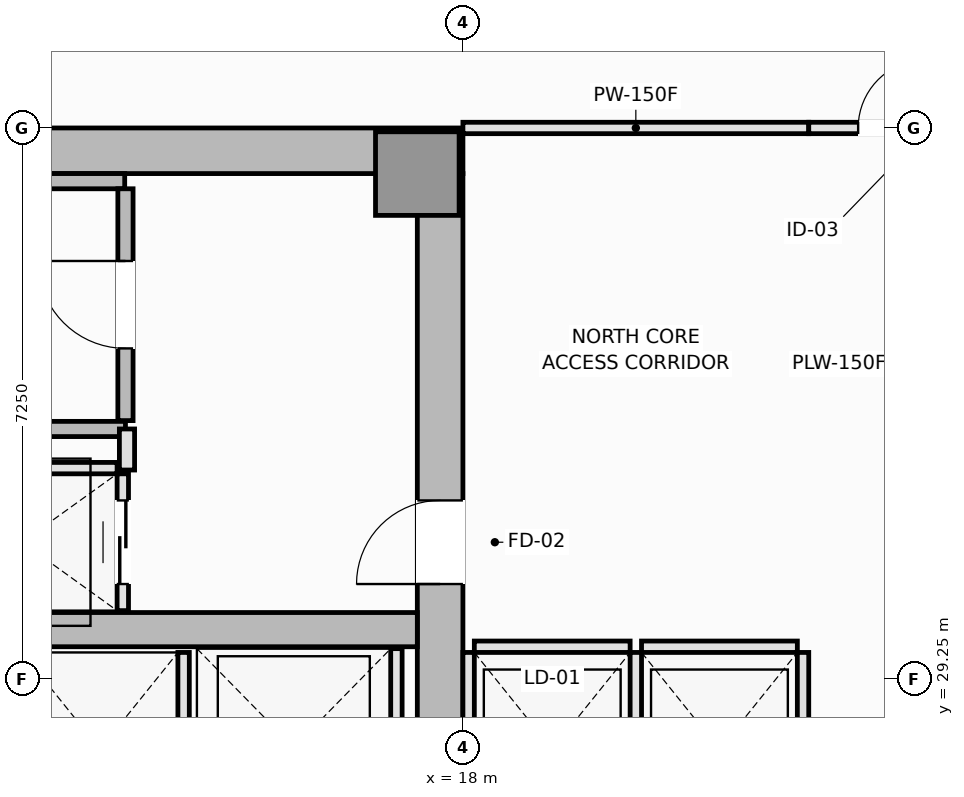
"""IFC4 building model, lengths in metres.
Left out: names, types, materials, properties, quantities, classifications, styles, units other than length and angle.
Written with IfcOpenShell. Run it as: python <this file> out.ifc"""

import sys

from ifc_helpers import new_model, si_unit, direction, frame, frame_2d, origin, origin_2d, place, context, subcontext, project, spatial, rectangle, extrude, element, fill, save


model = new_model("IFC4")
c1 = context("Model", 3, precision=1e-05, world=origin(), true_north=direction((0.0, 1.0)))
c2 = subcontext(c1, "Body", "Model", "MODEL_VIEW")
j1 = project(units=[si_unit("LENGTHUNIT", "METRE"), si_unit("PLANEANGLEUNIT", "RADIAN")], contexts=[c1])
p1 = place(None, origin())
s1 = spatial("IfcSite", under=j1, at=p1, CompositionType="ELEMENT")
p2 = place(p1, origin())
s2 = spatial("IfcBuilding", under=s1, at=p2, CompositionType="ELEMENT")
p3 = place(p2, frame((0.0, 0.0, 97.85)))
s3 = spatial("IfcBuildingStorey", under=s2, at=p3, CompositionType="ELEMENT", Elevation=97.85)
p4 = place(p3, frame((4.5, 36.2, 0.0), z_axis=(0.0, 0.0, 1.0), x_axis=(1.0, 0.0, 0.0)))
e1 = element("IfcWall", 1, at=p4, inside=s3, PredefinedType="SHEAR", context=c2, shape_type="SweptSolid", body=[
    extrude(rectangle(XDim=13.5, YDim=0.6, at=frame_2d((6.75, 0.0))), origin(), (0.0, 0.0, 1.0), 4.4),
])
p5 = place(p3, frame((17.7, 27.05, 0.0), z_axis=(0.0, 0.0, 1.0), x_axis=(0.0, 1.0, 0.0)))
e2 = element("IfcWall", 2, at=p5, inside=s3, PredefinedType="SHEAR", context=c2, shape_type="SweptSolid", body=[
    extrude(rectangle(XDim=8.85, YDim=0.6, at=frame_2d((4.425, 0.0))), origin(), (0.0, 0.0, 1.0), 4.4),
])
p6 = place(p5, frame((3.45, 0.0, 0.0)))
e3 = element("IfcOpeningElement", 3, at=p6, cuts=e2, PredefinedType="OPENING", context=c2, shape_type="SweptSolid", body=[
    extrude(rectangle(XDim=1.1, YDim=2.15, at=frame_2d((0.55, 1.075))), frame((0.0, 0.31, 0.0), z_axis=(0.0, -1.0, 0.0), x_axis=(1.0, 0.0, 0.0)), (0.0, 0.0, 1.0), 0.62),
])
p7 = place(p3, frame((5.1, 29.9, 0.0), z_axis=(0.0, 0.0, 1.0), x_axis=(1.0, 0.0, 0.0)))
e4 = element("IfcWall", 4, at=p7, inside=s3, PredefinedType="SHEAR", context=c2, shape_type="SweptSolid", body=[
    extrude(rectangle(XDim=12.3, YDim=0.45, at=frame_2d((6.15, 0.0))), origin(), (0.0, 0.0, 1.0), 4.4),
])
p8 = place(p3, frame((17.4, 35.9, 0.0), z_axis=(0.0, 0.0, 1.0), x_axis=(1.0, 0.0, 0.0)))
e5 = element("IfcColumn", 5, at=p8, inside=s3, PredefinedType="PILASTER", context=c2, shape_type="SweptSolid", body=[
    extrude(rectangle(XDim=1.1, YDim=1.1, at=origin_2d()), origin(), (0.0, 0.0, 1.0), 4.4),
])
p9 = place(p3, frame((5.8, 35.8, 0.0), z_axis=(0.0, 0.0, 1.0), x_axis=(1.0, 0.0, 0.0)))
e6 = element("IfcWall", 6, at=p9, inside=s3, PredefinedType="SOLIDWALL", context=c2, shape_type="SweptSolid", body=[
    extrude(rectangle(XDim=7.75, YDim=0.2, at=frame_2d((3.875, 0.0))), origin(), (0.0, 0.0, 1.0), 4.4),
])
p10 = place(p3, frame((5.9, 32.54, 0.0), z_axis=(0.0, 0.0, 1.0), x_axis=(1.0, 0.0, 0.0)))
e7 = element("IfcWall", 7, at=p10, inside=s3, PredefinedType="SOLIDWALL", context=c2, shape_type="SweptSolid", body=[
    extrude(rectangle(XDim=7.66, YDim=0.2, at=frame_2d((3.83, 0.0))), origin(), (0.0, 0.0, 1.0), 4.4),
])
p11 = place(p3, frame((13.56, 32.65, 0.0), z_axis=(0.0, 0.0, 1.0), x_axis=(0.0, 1.0, 0.0)))
e8 = element("IfcWall", 8, at=p11, inside=s3, PredefinedType="SOLIDWALL", context=c2, shape_type="SweptSolid", body=[
    extrude(rectangle(XDim=3.05, YDim=0.2, at=frame_2d((1.525, 0.0))), origin(), (0.0, 0.0, 1.0), 4.4),
])
p12 = place(p11, frame((0.95, 0.0, 0.0)))
e9 = element("IfcOpeningElement", 9, at=p12, cuts=e8, PredefinedType="OPENING", context=c2, shape_type="SweptSolid", body=[
    extrude(rectangle(XDim=1.15, YDim=2.15, at=frame_2d((0.575, 1.075))), frame((0.0, 0.11, 0.0), z_axis=(0.0, -1.0, 0.0), x_axis=(1.0, 0.0, 0.0)), (0.0, 0.0, 1.0), 0.22),
])
p13 = place(p3, frame((18.15, 29.675, 0.0), z_axis=(0.0, 0.0, 1.0), x_axis=(1.0, 0.0, 0.0)))
e10 = element("IfcWall", 10, at=p13, inside=s3, PredefinedType="PARTITIONING", context=c2, shape_type="SweptSolid", body=[
    extrude(rectangle(XDim=2.05, YDim=0.15, at=frame_2d((1.025, 0.0))), origin(), (0.0, 0.0, 1.0), 4.22),
])
for number, where, z_axis, x_axis in (
    (11, (18.075, 27.05, 0.0), (0.0, 0.0, 1.0), (0.0, 1.0, 0.0)),
    (12, (20.275, 27.05, 0.0), (0.0, 0.0, 1.0), (0.0, 1.0, 0.0)),
):
    element("IfcWall", number, at=place(p3, frame(where, z_axis=z_axis, x_axis=x_axis)), inside=s3, PredefinedType="PARTITIONING", context=c2, shape_type="SweptSolid", body=[
        extrude(rectangle(XDim=2.55, YDim=0.15, at=frame_2d((1.275, 0.0))), origin(), (0.0, 0.0, 1.0), 4.22),
    ])
p14 = place(p3, frame((20.35, 29.675, 0.0), z_axis=(0.0, 0.0, 1.0), x_axis=(1.0, 0.0, 0.0)))
e13 = element("IfcWall", 13, at=p14, inside=s3, PredefinedType="PARTITIONING", context=c2, shape_type="SweptSolid", body=[
    extrude(rectangle(XDim=2.05, YDim=0.15, at=frame_2d((1.025, 0.0))), origin(), (0.0, 0.0, 1.0), 4.22),
])
for number, where, z_axis, x_axis in (
    (14, (22.475, 27.05, 0.0), (0.0, 0.0, 1.0), (0.0, 1.0, 0.0)),
    (15, (14.325, 27.05, 0.0), (0.0, 0.0, 1.0), (0.0, 1.0, 0.0)),
):
    element("IfcWall", number, at=place(p3, frame(where, z_axis=z_axis, x_axis=x_axis)), inside=s3, PredefinedType="PARTITIONING", context=c2, shape_type="SweptSolid", body=[
        extrude(rectangle(XDim=2.55, YDim=0.15, at=frame_2d((1.275, 0.0))), origin(), (0.0, 0.0, 1.0), 4.22),
    ])
p15 = place(p3, frame((17.125, 27.05, 0.0), z_axis=(0.0, 0.0, 1.0), x_axis=(0.0, 1.0, 0.0)))
e16 = element("IfcWall", 16, at=p15, inside=s3, PredefinedType="PARTITIONING", context=c2, shape_type="SweptSolid", body=[
    extrude(rectangle(XDim=2.6, YDim=0.15, at=frame_2d((1.3, 0.0))), origin(), (0.0, 0.0, 1.0), 4.22),
])
p16 = place(p3, frame((10.95, 32.025, 0.0), z_axis=(0.0, 0.0, 1.0), x_axis=(1.0, 0.0, 0.0)))
e17 = element("IfcWall", 17, at=p16, inside=s3, PredefinedType="PARTITIONING", context=c2, shape_type="SweptSolid", body=[
    extrude(rectangle(XDim=2.5, YDim=0.15, at=frame_2d((1.25, 0.0))), origin(), (0.0, 0.0, 1.0), 4.22),
])
p17 = place(p3, frame((13.525, 30.15, 0.0), z_axis=(0.0, 0.0, 1.0), x_axis=(0.0, 1.0, 0.0)))
e18 = element("IfcWall", 18, at=p17, inside=s3, PredefinedType="PARTITIONING", context=c2, shape_type="SweptSolid", body=[
    extrude(rectangle(XDim=1.8, YDim=0.15, at=frame_2d((0.9, 0.0))), origin(), (0.0, 0.0, 1.0), 4.22),
])
p18 = place(p17, frame((0.35, 0.0, 0.0)))
e19 = element("IfcOpeningElement", 19, at=p18, cuts=e18, PredefinedType="OPENING", context=c2, shape_type="SweptSolid", body=[
    extrude(rectangle(XDim=1.1, YDim=2.2, at=frame_2d((0.55, 1.1))), frame((0.0, 0.085, 0.0), z_axis=(0.0, -1.0, 0.0), x_axis=(1.0, 0.0, 0.0)), (0.0, 0.0, 1.0), 0.17),
])
p19 = place(p3, frame((13.58, 32.0, 0.0), z_axis=(0.0, 0.0, 1.0), x_axis=(0.0, 1.0, 0.0)))
e20 = element("IfcWall", 20, at=p19, inside=s3, PredefinedType="PARTITIONING", context=c2, shape_type="SweptSolid", body=[
    extrude(rectangle(XDim=0.54, YDim=0.2, at=frame_2d((0.27, 0.0))), origin(), (0.0, 0.0, 1.0), 4.22),
])
p20 = place(p3, frame((18.0, 36.5, 0.0), z_axis=(0.0, 0.0, 1.0), x_axis=(1.0, 0.0, 0.0)))
e21 = element("IfcWall", 21, at=p20, inside=s3, PredefinedType="PARTITIONING", context=c2, shape_type="SweptSolid", body=[
    extrude(rectangle(XDim=4.55, YDim=0.15, at=frame_2d((2.275, 0.0))), origin(), (0.0, 0.0, 1.0), 4.22),
])
p21 = place(p3, frame((22.55, 36.5, 0.0), z_axis=(0.0, 0.0, 1.0), x_axis=(1.0, 0.0, 0.0)))
e22 = element("IfcWall", 22, at=p21, inside=s3, PredefinedType="PARTITIONING", context=c2, shape_type="SweptSolid", body=[
    extrude(rectangle(XDim=2.2, YDim=0.15, at=frame_2d((1.1, 0.0))), origin(), (0.0, 0.0, 1.0), 4.22),
])
p22 = place(p21, frame((0.65, 0.0, 0.0)))
e23 = element("IfcOpeningElement", 23, at=p22, cuts=e22, PredefinedType="OPENING", context=c2, shape_type="SweptSolid", body=[
    extrude(rectangle(XDim=0.9, YDim=2.1, at=frame_2d((0.45, 1.05))), frame((0.0, 0.085, 0.0), z_axis=(0.0, -1.0, 0.0), x_axis=(1.0, 0.0, 0.0)), (0.0, 0.0, 1.0), 0.17),
])
p23 = place(p12, origin())
e24 = element("IfcDoor", 24, at=p23, inside=s3, OperationType="SINGLE_SWING_RIGHT", PredefinedType="DOOR", context=c2, shape_type="SweptSolid", body=[
    extrude(rectangle(XDim=1.15, YDim=2.15, at=frame_2d((0.575, 1.075))), frame((0.0, 0.025, 0.0), z_axis=(0.0, -1.0, 0.0), x_axis=(1.0, 0.0, 0.0)), (0.0, 0.0, 1.0), 0.05),
])
fill(e9, e24)
p24 = place(p18, origin())
e25 = element("IfcDoor", 25, at=p24, inside=s3, OperationType="DOUBLE_DOOR_SLIDING", PredefinedType="DOOR", context=c2, shape_type="SweptSolid", body=[
    extrude(rectangle(XDim=1.1, YDim=2.2, at=frame_2d((0.55, 1.1))), frame((0.0, 0.025, 0.0), z_axis=(0.0, -1.0, 0.0), x_axis=(1.0, 0.0, 0.0)), (0.0, 0.0, 1.0), 0.05),
])
fill(e19, e25)
p25 = place(p6, origin())
e26 = element("IfcDoor", 26, at=p25, inside=s3, OperationType="SINGLE_SWING_LEFT", PredefinedType="DOOR", context=c2, shape_type="SweptSolid", body=[
    extrude(rectangle(XDim=1.1, YDim=2.15, at=frame_2d((0.55, 1.075))), frame((0.0, 0.025, 0.0), z_axis=(0.0, -1.0, 0.0), x_axis=(1.0, 0.0, 0.0)), (0.0, 0.0, 1.0), 0.05),
])
fill(e3, e26)
p26 = place(p22, origin())
e27 = element("IfcDoor", 27, at=p26, inside=s3, OperationType="SINGLE_SWING_RIGHT", PredefinedType="DOOR", context=c2, shape_type="SweptSolid", body=[
    extrude(rectangle(XDim=0.9, YDim=2.1, at=frame_2d((0.45, 1.05))), frame((0.0, 0.025, 0.0), z_axis=(0.0, -1.0, 0.0), x_axis=(1.0, 0.0, 0.0)), (0.0, 0.0, 1.0), 0.05),
])
fill(e23, e27)
save(model, sys.argv[1])
